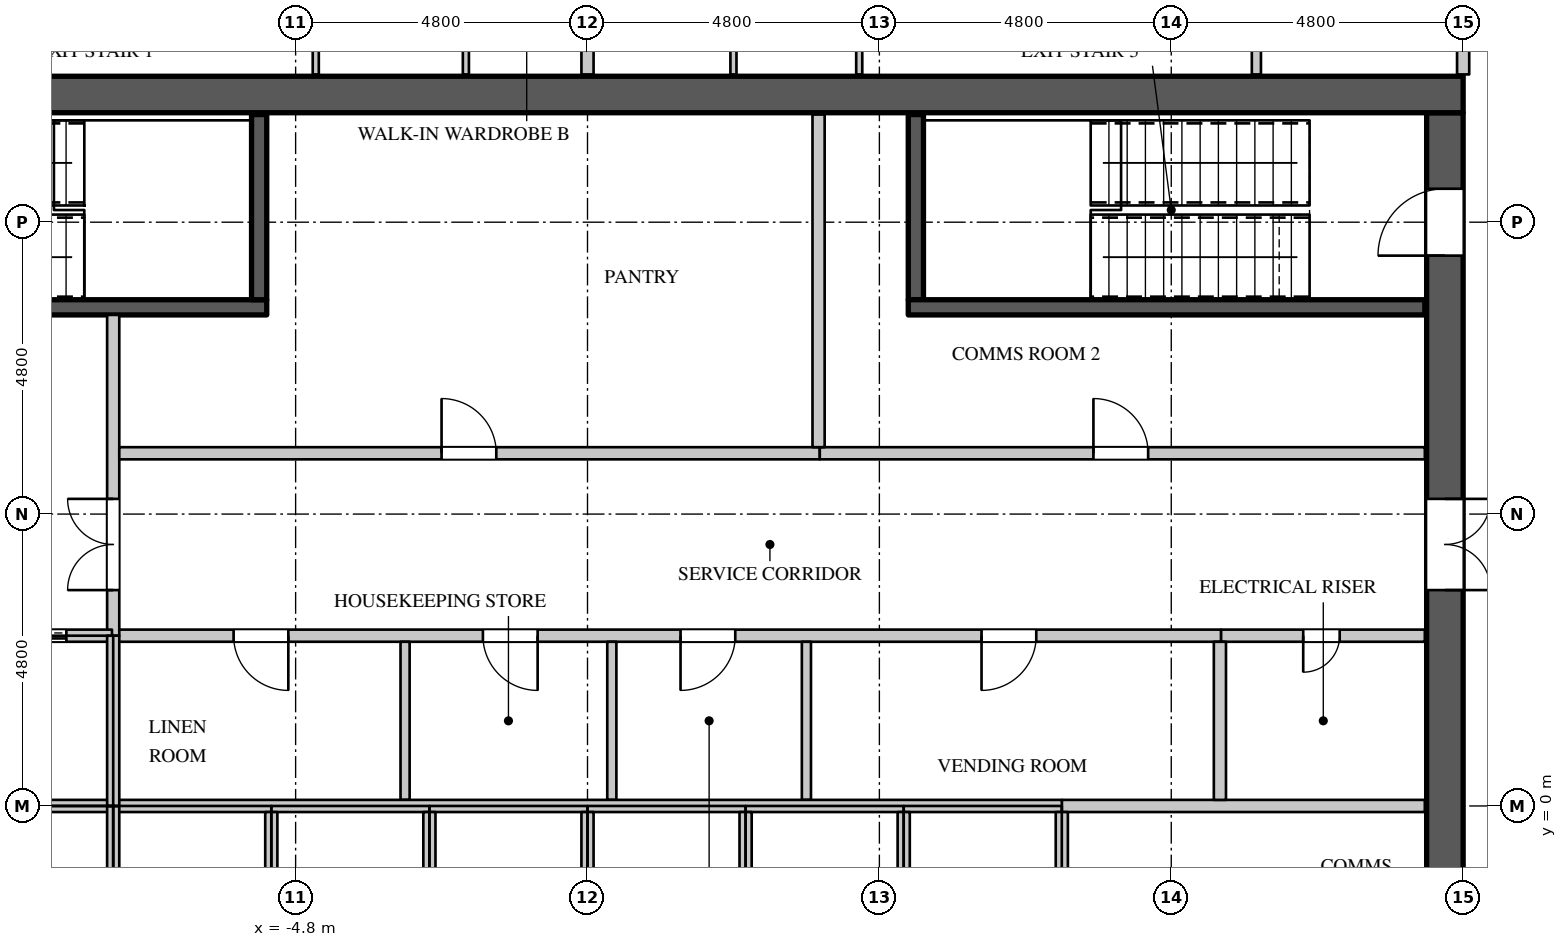
"""IFC4 building model, lengths in metres.
Left out: names, types, materials, properties, quantities, classifications, styles, units other than length and angle.
Written with IfcOpenShell. Run it as: python <this file> out.ifc"""

import sys

from ifc_helpers import new_model, si_unit, direction, frame, frame_2d, origin, place, context, subcontext, project, spatial, rectangle, extrude, element, fill, save


model = new_model("IFC4")
c1 = context("Model", 3, precision=1e-05, world=origin(), true_north=direction((0.0, 1.0)))
c2 = subcontext(c1, "Body", "Model", "MODEL_VIEW")
j1 = project(units=[si_unit("LENGTHUNIT", "METRE"), si_unit("PLANEANGLEUNIT", "RADIAN")], contexts=[c1])
p1 = place(None, origin())
s1 = spatial("IfcSite", under=j1, at=p1, CompositionType="ELEMENT")
p2 = place(p1, origin())
s2 = spatial("IfcBuilding", under=s1, at=p2, CompositionType="ELEMENT")
p3 = place(p2, frame((0.0, 0.0, 310.5)))
s3 = spatial("IfcBuildingStorey", under=s2, at=p3, CompositionType="ELEMENT", Elevation=310.5)
p4 = place(p3, frame((-14.4, 11.7, 0.0), z_axis=(0.0, 0.0, 1.0), x_axis=(1.0, 0.0, 0.0)))
e1 = element("IfcWall", 1, at=p4, inside=s3, PredefinedType="SHEAR", context=c2, shape_type="SweptSolid", body=[
    extrude(rectangle(XDim=28.8, YDim=0.6, at=frame_2d((14.4, 0.0))), origin(), (0.0, 0.0, 1.0), 4.2),
])
p5 = place(p3, frame((14.1, -11.4, 0.0), z_axis=(0.0, 0.0, 1.0), x_axis=(0.0, 1.0, 0.0)))
e2 = element("IfcWall", 2, at=p5, inside=s3, PredefinedType="SHEAR", context=c2, shape_type="SweptSolid", body=[
    extrude(rectangle(XDim=22.8, YDim=0.6, at=frame_2d((11.4, 0.0))), origin(), (0.0, 0.0, 1.0), 4.2),
])
p6 = place(p5, frame((20.45, 0.0, 0.0)))
e3 = element("IfcOpeningElement", 3, at=p6, cuts=e2, PredefinedType="OPENING", context=c2, shape_type="SweptSolid", body=[
    extrude(rectangle(XDim=1.1, YDim=2.2, at=frame_2d((0.55, 1.1))), frame((0.0, 0.31, 0.0), z_axis=(0.0, -1.0, 0.0), x_axis=(1.0, 0.0, 0.0)), (0.0, 0.0, 1.0), 0.62),
])
p7 = place(p5, frame((1.25, 0.0, 0.0)))
e4 = element("IfcOpeningElement", 4, at=p7, cuts=e2, PredefinedType="OPENING", context=c2, shape_type="SweptSolid", body=[
    extrude(rectangle(XDim=1.1, YDim=2.2, at=frame_2d((0.55, 1.1))), frame((0.0, 0.31, 0.0), z_axis=(0.0, -1.0, 0.0), x_axis=(1.0, 0.0, 0.0)), (0.0, 0.0, 1.0), 0.62),
])
p8 = place(p5, frame((14.95, 0.0, 0.0)))
e5 = element("IfcOpeningElement", 5, at=p8, cuts=e2, PredefinedType="OPENING", context=c2, shape_type="SweptSolid", body=[
    extrude(rectangle(XDim=1.5, YDim=2.4, at=frame_2d((0.75, 1.2))), frame((0.0, 0.31, 0.0), z_axis=(0.0, -1.0, 0.0), x_axis=(1.0, 0.0, 0.0)), (0.0, 0.0, 1.0), 0.62),
])
p9 = place(p5, frame((6.35, 0.0, 0.0)))
e6 = element("IfcOpeningElement", 6, at=p9, cuts=e2, PredefinedType="OPENING", context=c2, shape_type="SweptSolid", body=[
    extrude(rectangle(XDim=1.5, YDim=2.4, at=frame_2d((0.75, 1.2))), frame((0.0, 0.31, 0.0), z_axis=(0.0, -1.0, 0.0), x_axis=(1.0, 0.0, 0.0)), (0.0, 0.0, 1.0), 0.62),
])
p10 = place(p3, frame((-7.82, 2.8, 0.0), z_axis=(0.0, 0.0, 1.0), x_axis=(1.0, 0.0, 0.0)))
e7 = element("IfcWall", 7, at=p10, inside=s3, PredefinedType="PARTITIONING", context=c2, shape_type="SweptSolid", body=[
    extrude(rectangle(XDim=18.24, YDim=0.2, at=frame_2d((9.12, 0.0))), origin(), (0.0, 0.0, 1.0), 3.9),
])
p11 = place(p10, frame((2.0, 0.0, 0.0)))
e8 = element("IfcOpeningElement", 8, at=p11, cuts=e7, PredefinedType="OPENING", context=c2, shape_type="SweptSolid", body=[
    extrude(rectangle(XDim=0.9, YDim=2.2, at=frame_2d((0.45, 1.1))), frame((0.0, 0.11, 0.0), z_axis=(0.0, -1.0, 0.0), x_axis=(1.0, 0.0, 0.0)), (0.0, 0.0, 1.0), 0.22),
])
p12 = place(p10, frame((6.1, 0.0, 0.0)))
e9 = element("IfcOpeningElement", 9, at=p12, cuts=e7, PredefinedType="OPENING", context=c2, shape_type="SweptSolid", body=[
    extrude(rectangle(XDim=0.9, YDim=2.2, at=frame_2d((0.45, 1.1))), frame((0.0, 0.11, 0.0), z_axis=(0.0, -1.0, 0.0), x_axis=(1.0, 0.0, 0.0)), (0.0, 0.0, 1.0), 0.22),
])
p13 = place(p10, frame((9.35, 0.0, 0.0)))
e10 = element("IfcOpeningElement", 10, at=p13, cuts=e7, PredefinedType="OPENING", context=c2, shape_type="SweptSolid", body=[
    extrude(rectangle(XDim=0.9, YDim=2.2, at=frame_2d((0.45, 1.1))), frame((0.0, 0.11, 0.0), z_axis=(0.0, -1.0, 0.0), x_axis=(1.0, 0.0, 0.0)), (0.0, 0.0, 1.0), 0.22),
])
p14 = place(p10, frame((14.3, 0.0, 0.0)))
e11 = element("IfcOpeningElement", 11, at=p14, cuts=e7, PredefinedType="OPENING", context=c2, shape_type="SweptSolid", body=[
    extrude(rectangle(XDim=0.9, YDim=2.2, at=frame_2d((0.45, 1.1))), frame((0.0, 0.11, 0.0), z_axis=(0.0, -1.0, 0.0), x_axis=(1.0, 0.0, 0.0)), (0.0, 0.0, 1.0), 0.22),
])
p15 = place(p3, frame((-7.8, 2.8, 0.0), z_axis=(0.0, 0.0, 1.0), x_axis=(0.0, 1.0, 0.0)))
e12 = element("IfcWall", 12, at=p15, inside=s3, PredefinedType="PARTITIONING", context=c2, shape_type="SweptSolid", body=[
    extrude(rectangle(XDim=5.275, YDim=0.2, at=frame_2d((2.637, 0.0))), origin(), (0.0, 0.0, 1.0), 3.9),
])
p16 = place(p15, frame((0.75, 0.0, 0.0)))
e13 = element("IfcOpeningElement", 13, at=p16, cuts=e12, PredefinedType="OPENING", context=c2, shape_type="SweptSolid", body=[
    extrude(rectangle(XDim=1.5, YDim=2.4, at=frame_2d((0.75, 1.2))), frame((0.0, 0.11, 0.0), z_axis=(0.0, -1.0, 0.0), x_axis=(1.0, 0.0, 0.0)), (0.0, 0.0, 1.0), 0.22),
])
p17 = place(p3, frame((-7.7, 5.8, 0.0), z_axis=(0.0, 0.0, 1.0), x_axis=(1.0, 0.0, 0.0)))
e14 = element("IfcWall", 14, at=p17, inside=s3, PredefinedType="PARTITIONING", context=c2, shape_type="SweptSolid", body=[
    extrude(rectangle(XDim=11.52, YDim=0.2, at=frame_2d((5.76, 0.0))), origin(), (0.0, 0.0, 1.0), 3.9),
])
p18 = place(p17, frame((5.3, 0.0, 0.0)))
e15 = element("IfcOpeningElement", 15, at=p18, cuts=e14, PredefinedType="OPENING", context=c2, shape_type="SweptSolid", body=[
    extrude(rectangle(XDim=0.9, YDim=2.2, at=frame_2d((0.45, 1.1))), frame((0.0, 0.11, 0.0), z_axis=(0.0, -1.0, 0.0), x_axis=(1.0, 0.0, 0.0)), (0.0, 0.0, 1.0), 0.22),
])
p19 = place(p3, frame((14.4, 12.03, 0.0), z_axis=(0.0, 0.0, 1.0), x_axis=(0.0, 1.0, 0.0)))
e16 = element("IfcWall", 16, at=p19, inside=s3, PredefinedType="PARTITIONING", context=c2, shape_type="SweptSolid", body=[
    extrude(rectangle(XDim=2.27, YDim=0.2, at=frame_2d((1.135, 0.0))), origin(), (0.0, 0.0, 1.0), 3.9),
])
for number, where, z_axis, x_axis in (
    (17, (-3.0, 0.1, 0.0), (0.0, 0.0, 1.0), (0.0, 1.0, 0.0)),
    (18, (0.4, 0.1, 0.0), (0.0, 0.0, 1.0), (0.0, 1.0, 0.0)),
    (19, (3.6, 0.1, 0.0), (0.0, 0.0, 1.0), (0.0, 1.0, 0.0)),
):
    element("IfcWall", number, at=place(p3, frame(where, z_axis=z_axis, x_axis=x_axis)), inside=s3, PredefinedType="PARTITIONING", context=c2, shape_type="SweptSolid", body=[
        extrude(rectangle(XDim=2.6, YDim=0.15, at=frame_2d((1.3, 0.0))), origin(), (0.0, 0.0, 1.0), 3.9),
    ])
p20 = place(p3, frame((11.0, 12.03, 0.0), z_axis=(0.0, 0.0, 1.0), x_axis=(0.0, 1.0, 0.0)))
e20 = element("IfcWall", 20, at=p20, inside=s3, PredefinedType="PARTITIONING", context=c2, shape_type="SweptSolid", body=[
    extrude(rectangle(XDim=5.045, YDim=0.15, at=frame_2d((2.522, 0.0))), origin(), (0.0, 0.0, 1.0), 3.9),
])
p21 = place(p20, frame((2.0, 0.0, 0.0)))
e21 = element("IfcOpeningElement", 21, at=p21, cuts=e20, PredefinedType="OPENING", context=c2, shape_type="SweptSolid", body=[
    extrude(rectangle(XDim=0.95, YDim=2.2, at=frame_2d((0.475, 1.1))), frame((0.0, 0.085, 0.0), z_axis=(0.0, -1.0, 0.0), x_axis=(1.0, 0.0, 0.0)), (0.0, 0.0, 1.0), 0.17),
])
p22 = place(p3, frame((0.0, 12.03, 0.0), z_axis=(0.0, 0.0, 1.0), x_axis=(0.0, 1.0, 0.0)))
e22 = element("IfcWall", 22, at=p22, inside=s3, PredefinedType="PARTITIONING", context=c2, shape_type="SweptSolid", body=[
    extrude(rectangle(XDim=14.425, YDim=0.2, at=frame_2d((7.212, 0.0))), origin(), (0.0, 0.0, 1.0), 3.9),
])
p23 = place(p3, frame((3.82, 5.8, 0.0), z_axis=(0.0, 0.0, 1.0), x_axis=(1.0, 0.0, 0.0)))
e23 = element("IfcWall", 23, at=p23, inside=s3, PredefinedType="PARTITIONING", context=c2, shape_type="SweptSolid", body=[
    extrude(rectangle(XDim=9.95, YDim=0.2, at=frame_2d((4.975, 0.0))), origin(), (0.0, 0.0, 1.0), 3.9),
])
p24 = place(p23, frame((4.5, 0.0, 0.0)))
e24 = element("IfcOpeningElement", 24, at=p24, cuts=e23, PredefinedType="OPENING", context=c2, shape_type="SweptSolid", body=[
    extrude(rectangle(XDim=0.9, YDim=2.2, at=frame_2d((0.45, 1.1))), frame((0.0, 0.11, 0.0), z_axis=(0.0, -1.0, 0.0), x_axis=(1.0, 0.0, 0.0)), (0.0, 0.0, 1.0), 0.22),
])
p25 = place(p3, frame((3.8, 5.9, 0.0), z_axis=(0.0, 0.0, 1.0), x_axis=(0.0, 1.0, 0.0)))
e25 = element("IfcWall", 25, at=p25, inside=s3, PredefinedType="PARTITIONING", context=c2, shape_type="SweptSolid", body=[
    extrude(rectangle(XDim=5.47, YDim=0.2, at=frame_2d((2.735, 0.0))), origin(), (0.0, 0.0, 1.0), 3.9),
])
p26 = place(p3, frame((7.8, 0.0, 0.0), z_axis=(0.0, 0.0, 1.0), x_axis=(1.0, 0.0, 0.0)))
e26 = element("IfcWall", 26, at=p26, inside=s3, PredefinedType="PARTITIONING", context=c2, shape_type="SweptSolid", body=[
    extrude(rectangle(XDim=5.97, YDim=0.2, at=frame_2d((2.985, 0.0))), origin(), (0.0, 0.0, 1.0), 3.9),
])
p27 = place(p3, frame((10.42, 2.8, 0.0), z_axis=(0.0, 0.0, 1.0), x_axis=(1.0, 0.0, 0.0)))
e27 = element("IfcWall", 27, at=p27, inside=s3, PredefinedType="PARTITIONING", context=c2, shape_type="SweptSolid", body=[
    extrude(rectangle(XDim=3.35, YDim=0.2, at=frame_2d((1.675, 0.0))), origin(), (0.0, 0.0, 1.0), 3.9),
])
p28 = place(p27, frame((1.35, 0.0, 0.0)))
e28 = element("IfcOpeningElement", 28, at=p28, cuts=e27, PredefinedType="OPENING", context=c2, shape_type="SweptSolid", body=[
    extrude(rectangle(XDim=0.6, YDim=2.0, at=frame_2d((0.3, 1.0))), frame((0.0, 0.11, 0.0), z_axis=(0.0, -1.0, 0.0), x_axis=(1.0, 0.0, 0.0)), (0.0, 0.0, 1.0), 0.22),
])
p29 = place(p3, frame((10.4, 0.1, 0.0), z_axis=(0.0, 0.0, 1.0), x_axis=(0.0, 1.0, 0.0)))
e29 = element("IfcWall", 29, at=p29, inside=s3, PredefinedType="PARTITIONING", context=c2, shape_type="SweptSolid", body=[
    extrude(rectangle(XDim=2.6, YDim=0.2, at=frame_2d((1.3, 0.0))), origin(), (0.0, 0.0, 1.0), 3.9),
])
p30 = place(p3, frame((-13.77, 0.0, 0.0), z_axis=(0.0, 0.0, 1.0), x_axis=(1.0, 0.0, 0.0)))
e30 = element("IfcWall", 30, at=p30, inside=s3, PredefinedType="PARTITIONING", context=c2, shape_type="SweptSolid", body=[
    extrude(rectangle(XDim=21.57, YDim=0.2, at=frame_2d((10.785, 0.0))), origin(), (0.0, 0.0, 1.0), 3.9),
])
p31 = place(p3, frame((-13.77, 2.8, 0.0), z_axis=(0.0, 0.0, 1.0), x_axis=(1.0, 0.0, 0.0)))
e31 = element("IfcWall", 31, at=p31, inside=s3, PredefinedType="PARTITIONING", context=c2, shape_type="SweptSolid", body=[
    extrude(rectangle(XDim=5.95, YDim=0.2, at=frame_2d((2.975, 0.0))), origin(), (0.0, 0.0, 1.0), 3.9),
])
p32 = place(p31, frame((1.1, 0.0, 0.0)))
e32 = element("IfcOpeningElement", 32, at=p32, cuts=e31, PredefinedType="OPENING", context=c2, shape_type="SweptSolid", body=[
    extrude(rectangle(XDim=1.1, YDim=2.2, at=frame_2d((0.55, 1.1))), frame((0.0, 0.11, 0.0), z_axis=(0.0, -1.0, 0.0), x_axis=(1.0, 0.0, 0.0)), (0.0, 0.0, 1.0), 0.22),
])
p33 = place(p31, frame((4.1, 0.0, 0.0)))
e33 = element("IfcOpeningElement", 33, at=p33, cuts=e31, PredefinedType="OPENING", context=c2, shape_type="SweptSolid", body=[
    extrude(rectangle(XDim=1.1, YDim=2.2, at=frame_2d((0.55, 1.1))), frame((0.0, 0.11, 0.0), z_axis=(0.0, -1.0, 0.0), x_axis=(1.0, 0.0, 0.0)), (0.0, 0.0, 1.0), 0.22),
])
for number, where, z_axis, x_axis in (
    (34, (-7.8, -2.8, 0.0), (0.0, 0.0, 1.0), (0.0, 1.0, 0.0)),
    (35, (-7.8, 0.0, 0.0), (0.0, 0.0, 1.0), (0.0, 1.0, 0.0)),
):
    element("IfcWall", number, at=place(p3, frame(where, z_axis=z_axis, x_axis=x_axis)), inside=s3, PredefinedType="PARTITIONING", context=c2, shape_type="SweptSolid", body=[
        extrude(rectangle(XDim=2.8, YDim=0.2, at=frame_2d((1.4, 0.0))), origin(), (0.0, 0.0, 1.0), 3.9),
    ])
for number, where, z_axis, x_axis in (
    (36, (-5.2, -2.7, 0.0), (0.0, 0.0, 1.0), (0.0, 1.0, 0.0)),
    (37, (-2.6, -2.7, 0.0), (0.0, 0.0, 1.0), (0.0, 1.0, 0.0)),
    (38, (0.0, -2.7, 0.0), (0.0, 0.0, 1.0), (0.0, 1.0, 0.0)),
    (39, (2.6, -2.7, 0.0), (0.0, 0.0, 1.0), (0.0, 1.0, 0.0)),
    (40, (5.2, -2.7, 0.0), (0.0, 0.0, 1.0), (0.0, 1.0, 0.0)),
    (41, (7.8, -2.7, 0.0), (0.0, 0.0, 1.0), (0.0, 1.0, 0.0)),
):
    element("IfcWall", number, at=place(p3, frame(where, z_axis=z_axis, x_axis=x_axis)), inside=s3, PredefinedType="PARTITIONING", context=c2, shape_type="SweptSolid", body=[
        extrude(rectangle(XDim=2.6, YDim=0.2, at=frame_2d((1.3, 0.0))), origin(), (0.0, 0.0, 1.0), 3.9),
    ])
p34 = place(p3, frame((-13.77, 8.2, 0.0), z_axis=(0.0, 0.0, 1.0), x_axis=(1.0, 0.0, 0.0)))
e42 = element("IfcWall", 42, at=p34, inside=s3, PredefinedType="SHEAR", context=c2, shape_type="SweptSolid", body=[
    extrude(rectangle(XDim=8.495, YDim=0.25, at=frame_2d((4.248, 0.0))), origin(), (0.0, 0.0, 1.0), 3.9),
])
p35 = place(p34, frame((0.15, 0.0, 0.0)))
e43 = element("IfcOpeningElement", 43, at=p35, cuts=e42, PredefinedType="OPENING", context=c2, shape_type="SweptSolid", body=[
    extrude(rectangle(XDim=1.1, YDim=2.2, at=frame_2d((0.55, 1.1))), frame((0.0, 0.135, 0.0), z_axis=(0.0, -1.0, 0.0), x_axis=(1.0, 0.0, 0.0)), (0.0, 0.0, 1.0), 0.27),
])
for number, where, z_axis, x_axis in (
    (44, (-5.4, 8.325, 0.0), (0.0, 0.0, 1.0), (0.0, 1.0, 0.0)),
    (45, (5.4, 8.325, 0.0), (0.0, 0.0, 1.0), (0.0, 1.0, 0.0)),
):
    element("IfcWall", number, at=place(p3, frame(where, z_axis=z_axis, x_axis=x_axis)), inside=s3, PredefinedType="SHEAR", context=c2, shape_type="SweptSolid", body=[
        extrude(rectangle(XDim=3.045, YDim=0.25, at=frame_2d((1.522, 0.0))), origin(), (0.0, 0.0, 1.0), 3.9),
    ])
p36 = place(p3, frame((5.275, 8.2, 0.0), z_axis=(0.0, 0.0, 1.0), x_axis=(1.0, 0.0, 0.0)))
e46 = element("IfcWall", 46, at=p36, inside=s3, PredefinedType="SHEAR", context=c2, shape_type="SweptSolid", body=[
    extrude(rectangle(XDim=8.495, YDim=0.25, at=frame_2d((4.248, 0.0))), origin(), (0.0, 0.0, 1.0), 3.9),
])
p37 = place(p3, frame((-4.469, 12.03, 0.0), z_axis=(0.0, 0.0, 1.0), x_axis=(0.0, 1.0, 0.0)))
e47 = element("IfcWall", 47, at=p37, inside=s3, PredefinedType="PARTITIONING", context=c2, shape_type="SweptSolid", body=[
    extrude(rectangle(XDim=5.75, YDim=0.1, at=frame_2d((2.875, 0.0))), origin(), (0.0, 0.0, 1.0), 3.3),
])
p38 = place(p3, frame((-2.0, 12.03, 0.0), z_axis=(0.0, 0.0, 1.0), x_axis=(0.0, 1.0, 0.0)))
e48 = element("IfcWall", 48, at=p38, inside=s3, PredefinedType="PARTITIONING", context=c2, shape_type="SweptSolid", body=[
    extrude(rectangle(XDim=5.72, YDim=0.1, at=frame_2d((2.86, 0.0))), origin(), (0.0, 0.0, 1.0), 3.9),
])
p39 = place(p3, frame((2.4, 12.03, 0.0), z_axis=(0.0, 0.0, 1.0), x_axis=(0.0, 1.0, 0.0)))
e49 = element("IfcWall", 49, at=p39, inside=s3, PredefinedType="PARTITIONING", context=c2, shape_type="SweptSolid", body=[
    extrude(rectangle(XDim=5.52, YDim=0.1, at=frame_2d((2.76, 0.0))), origin(), (0.0, 0.0, 1.0), 3.9),
])
p40 = place(p3, frame((4.469, 12.03, 0.0), z_axis=(0.0, 0.0, 1.0), x_axis=(0.0, 1.0, 0.0)))
e50 = element("IfcWall", 50, at=p40, inside=s3, PredefinedType="PARTITIONING", context=c2, shape_type="SweptSolid", body=[
    extrude(rectangle(XDim=5.55, YDim=0.1, at=frame_2d((2.775, 0.0))), origin(), (0.0, 0.0, 1.0), 3.3),
])
p41 = place(p28, origin())
e51 = element("IfcDoor", 51, at=p41, inside=s3, OperationType="SINGLE_SWING_RIGHT", PredefinedType="DOOR", context=c2, shape_type="SweptSolid", body=[
    extrude(rectangle(XDim=0.6, YDim=2.0, at=frame_2d((0.3, 1.0))), frame((0.0, 0.025, 0.0), z_axis=(0.0, -1.0, 0.0), x_axis=(1.0, 0.0, 0.0)), (0.0, 0.0, 1.0), 0.05),
])
fill(e28, e51)
p42 = place(p18, origin())
e52 = element("IfcDoor", 52, at=p42, inside=s3, OperationType="SINGLE_SWING_LEFT", PredefinedType="DOOR", context=c2, shape_type="SweptSolid", body=[
    extrude(rectangle(XDim=0.9, YDim=2.2, at=frame_2d((0.45, 1.1))), frame((0.0, 0.025, 0.0), z_axis=(0.0, -1.0, 0.0), x_axis=(1.0, 0.0, 0.0)), (0.0, 0.0, 1.0), 0.05),
])
fill(e15, e52)
p43 = place(p24, origin())
e53 = element("IfcDoor", 53, at=p43, inside=s3, OperationType="SINGLE_SWING_LEFT", PredefinedType="DOOR", context=c2, shape_type="SweptSolid", body=[
    extrude(rectangle(XDim=0.9, YDim=2.2, at=frame_2d((0.45, 1.1))), frame((0.0, 0.025, 0.0), z_axis=(0.0, -1.0, 0.0), x_axis=(1.0, 0.0, 0.0)), (0.0, 0.0, 1.0), 0.05),
])
fill(e24, e53)
p44 = place(p11, origin())
e54 = element("IfcDoor", 54, at=p44, inside=s3, OperationType="SINGLE_SWING_LEFT", PredefinedType="DOOR", context=c2, shape_type="SweptSolid", body=[
    extrude(rectangle(XDim=0.9, YDim=2.2, at=frame_2d((0.45, 1.1))), frame((0.0, 0.025, 0.0), z_axis=(0.0, -1.0, 0.0), x_axis=(1.0, 0.0, 0.0)), (0.0, 0.0, 1.0), 0.05),
])
fill(e8, e54)
p45 = place(p12, origin())
e55 = element("IfcDoor", 55, at=p45, inside=s3, OperationType="SINGLE_SWING_LEFT", PredefinedType="DOOR", context=c2, shape_type="SweptSolid", body=[
    extrude(rectangle(XDim=0.9, YDim=2.2, at=frame_2d((0.45, 1.1))), frame((0.0, 0.025, 0.0), z_axis=(0.0, -1.0, 0.0), x_axis=(1.0, 0.0, 0.0)), (0.0, 0.0, 1.0), 0.05),
])
fill(e9, e55)
p46 = place(p13, origin())
e56 = element("IfcDoor", 56, at=p46, inside=s3, OperationType="SINGLE_SWING_RIGHT", PredefinedType="DOOR", context=c2, shape_type="SweptSolid", body=[
    extrude(rectangle(XDim=0.9, YDim=2.2, at=frame_2d((0.45, 1.1))), frame((0.0, 0.025, 0.0), z_axis=(0.0, -1.0, 0.0), x_axis=(1.0, 0.0, 0.0)), (0.0, 0.0, 1.0), 0.05),
])
fill(e10, e56)
p47 = place(p14, origin())
e57 = element("IfcDoor", 57, at=p47, inside=s3, OperationType="SINGLE_SWING_RIGHT", PredefinedType="DOOR", context=c2, shape_type="SweptSolid", body=[
    extrude(rectangle(XDim=0.9, YDim=2.2, at=frame_2d((0.45, 1.1))), frame((0.0, 0.025, 0.0), z_axis=(0.0, -1.0, 0.0), x_axis=(1.0, 0.0, 0.0)), (0.0, 0.0, 1.0), 0.05),
])
fill(e11, e57)
p48 = place(p33, origin())
e58 = element("IfcDoor", 58, at=p48, inside=s3, OperationType="DOUBLE_DOOR_SLIDING", PredefinedType="DOOR", context=c2, shape_type="SweptSolid", body=[
    extrude(rectangle(XDim=1.1, YDim=2.2, at=frame_2d((0.55, 1.1))), frame((0.0, 0.025, 0.0), z_axis=(0.0, -1.0, 0.0), x_axis=(1.0, 0.0, 0.0)), (0.0, 0.0, 1.0), 0.05),
])
fill(e33, e58)
p49 = place(p16, origin())
e59 = element("IfcDoor", 59, at=p49, inside=s3, OperationType="DOUBLE_DOOR_SINGLE_SWING", PredefinedType="DOOR", context=c2, shape_type="SweptSolid", body=[
    extrude(rectangle(XDim=1.5, YDim=2.4, at=frame_2d((0.75, 1.2))), frame((0.0, 0.025, 0.0), z_axis=(0.0, -1.0, 0.0), x_axis=(1.0, 0.0, 0.0)), (0.0, 0.0, 1.0), 0.05),
])
fill(e13, e59)
p50 = place(p6, origin())
e60 = element("IfcDoor", 60, at=p50, inside=s3, OperationType="SINGLE_SWING_LEFT", PredefinedType="DOOR", context=c2, shape_type="SweptSolid", body=[
    extrude(rectangle(XDim=1.1, YDim=2.2, at=frame_2d((0.55, 1.1))), frame((0.0, 0.295, 0.0), z_axis=(0.0, -1.0, 0.0), x_axis=(1.0, 0.0, 0.0)), (0.0, 0.0, 1.0), 0.05),
])
fill(e3, e60)
p51 = place(p8, origin())
e61 = element("IfcDoor", 61, at=p51, inside=s3, OperationType="DOUBLE_DOOR_SINGLE_SWING", PredefinedType="DOOR", context=c2, shape_type="SweptSolid", body=[
    extrude(rectangle(XDim=1.5, YDim=2.4, at=frame_2d((0.75, 1.2))), frame((0.0, -0.245, 0.0), z_axis=(0.0, -1.0, 0.0), x_axis=(1.0, 0.0, 0.0)), (0.0, 0.0, 1.0), 0.05),
])
fill(e5, e61)
save(model, sys.argv[1])
